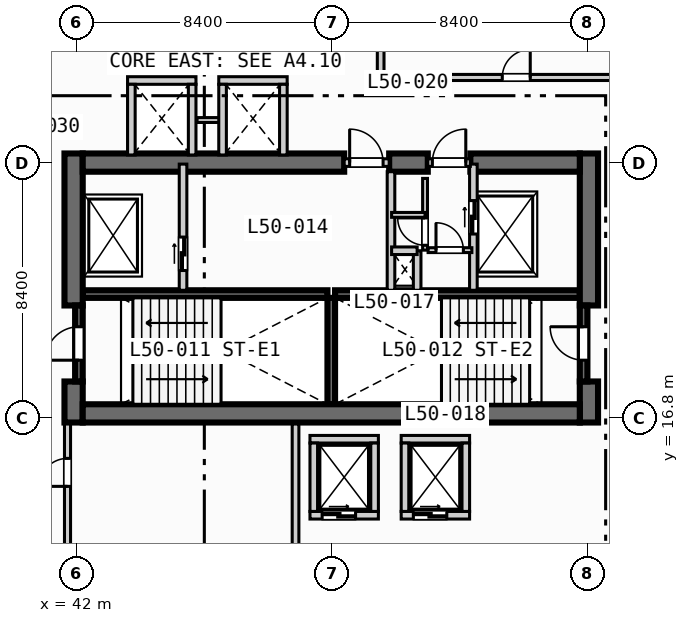
"""IFC4 building model, lengths in metres.
Left out: names, types, materials, properties, quantities, classifications, styles, units other than length and angle.
Written with IfcOpenShell. Run it as: python <this file> out.ifc"""

import sys

from ifc_helpers import new_model, si_unit, direction, frame, frame_2d, origin, place, context, subcontext, project, spatial, rectangle, extrude, element, fill, save


model = new_model("IFC4")
c1 = context("Model", 3, precision=1e-05, world=origin(), true_north=direction((0.0, 1.0)))
c2 = subcontext(c1, "Body", "Model", "MODEL_VIEW")
j1 = project(units=[si_unit("LENGTHUNIT", "METRE"), si_unit("PLANEANGLEUNIT", "RADIAN")], contexts=[c1])
p1 = place(None, origin())
s1 = spatial("IfcSite", under=j1, at=p1, CompositionType="ELEMENT")
p2 = place(p1, origin())
s2 = spatial("IfcBuilding", under=s1, at=p2, CompositionType="ELEMENT")
p3 = place(p2, frame((0.0, 0.0, 205.0)))
s3 = spatial("IfcBuildingStorey", under=s2, at=p3, CompositionType="ELEMENT", Elevation=205.0)
for number, where, z_axis, x_axis in (
    (1, (42.2, 20.875, 0.0), (0.0, 0.0, 1.0), (1.0, 0.0, 0.0)),
    (2, (50.5, 20.875, 0.0), (0.0, 0.0, 1.0), (1.0, 0.0, 0.0)),
):
    element("IfcWall", number, at=place(p3, frame(where, z_axis=z_axis, x_axis=x_axis)), inside=s3, PredefinedType="SOLIDWALL", context=c2, shape_type="SweptSolid", body=[
        extrude(rectangle(XDim=8.05, YDim=0.25, at=frame_2d((4.025, 0.0))), origin(), (0.0, 0.0, 1.0), 3.47),
    ])
p4 = place(p3, frame((50.375, 17.25, 0.0), z_axis=(0.0, 0.0, 1.0), x_axis=(0.0, 1.0, 0.0)))
e3 = element("IfcWall", 3, at=p4, inside=s3, PredefinedType="SOLIDWALL", context=c2, shape_type="SweptSolid", body=[
    extrude(rectangle(XDim=3.5, YDim=0.25, at=frame_2d((1.75, 0.0))), origin(), (0.0, 0.0, 1.0), 3.47),
])
p5 = place(p3, frame((41.9, 16.65, 0.0), z_axis=(0.0, 0.0, 1.0), x_axis=(0.0, 1.0, 0.0)))
e4 = element("IfcWall", 4, at=p5, inside=s3, PredefinedType="SHEAR", context=c2, shape_type="SweptSolid", body=[
    extrude(rectangle(XDim=1.35, YDim=0.6, at=frame_2d((0.675, 0.0))), origin(), (0.0, 0.0, 1.0), 3.47),
])
p6 = place(p3, frame((41.9, 20.5, 0.0), z_axis=(0.0, 0.0, 1.0), x_axis=(0.0, 1.0, 0.0)))
e5 = element("IfcWall", 5, at=p6, inside=s3, PredefinedType="SHEAR", context=c2, shape_type="SweptSolid", body=[
    extrude(rectangle(XDim=5.0, YDim=0.6, at=frame_2d((2.5, 0.0))), origin(), (0.0, 0.0, 1.0), 3.47),
])
p7 = place(p3, frame((58.85, 16.65, 0.0), z_axis=(0.0, 0.0, 1.0), x_axis=(0.0, 1.0, 0.0)))
e6 = element("IfcWall", 6, at=p7, inside=s3, PredefinedType="SHEAR", context=c2, shape_type="SweptSolid", body=[
    extrude(rectangle(XDim=1.35, YDim=0.6, at=frame_2d((0.675, 0.0))), origin(), (0.0, 0.0, 1.0), 3.47),
])
p8 = place(p3, frame((58.85, 20.5, 0.0), z_axis=(0.0, 0.0, 1.0), x_axis=(0.0, 1.0, 0.0)))
e7 = element("IfcWall", 7, at=p8, inside=s3, PredefinedType="SHEAR", context=c2, shape_type="SweptSolid", body=[
    extrude(rectangle(XDim=5.0, YDim=0.6, at=frame_2d((2.5, 0.0))), origin(), (0.0, 0.0, 1.0), 3.47),
])
p9 = place(p3, frame((42.2, 16.95, 0.0), z_axis=(0.0, 0.0, 1.0), x_axis=(1.0, 0.0, 0.0)))
e8 = element("IfcWall", 8, at=p9, inside=s3, PredefinedType="SHEAR", context=c2, shape_type="SweptSolid", body=[
    extrude(rectangle(XDim=16.35, YDim=0.6, at=frame_2d((8.175, 0.0))), origin(), (0.0, 0.0, 1.0), 3.47),
])
p10 = place(p3, frame((42.2, 25.2, 0.0), z_axis=(0.0, 0.0, 1.0), x_axis=(1.0, 0.0, 0.0)))
e9 = element("IfcWall", 9, at=p10, inside=s3, PredefinedType="SHEAR", context=c2, shape_type="SweptSolid", body=[
    extrude(rectangle(XDim=8.6, YDim=0.6, at=frame_2d((4.3, 0.0))), origin(), (0.0, 0.0, 1.0), 3.47),
])
p11 = place(p3, frame((52.28, 25.2, 0.0), z_axis=(0.0, 0.0, 1.0), x_axis=(1.0, 0.0, 0.0)))
e10 = element("IfcWall", 10, at=p11, inside=s3, PredefinedType="SHEAR", context=c2, shape_type="SweptSolid", body=[
    extrude(rectangle(XDim=1.27, YDim=0.6, at=frame_2d((0.635, 0.0))), origin(), (0.0, 0.0, 1.0), 3.47),
])
p12 = place(p3, frame((54.95, 25.2, 0.0), z_axis=(0.0, 0.0, 1.0), x_axis=(1.0, 0.0, 0.0)))
e11 = element("IfcWall", 11, at=p12, inside=s3, PredefinedType="SHEAR", context=c2, shape_type="SweptSolid", body=[
    extrude(rectangle(XDim=3.6, YDim=0.6, at=frame_2d((1.8, 0.0))), origin(), (0.0, 0.0, 1.0), 3.47),
])
p13 = place(p3, frame((42.075, 18.0, 0.0), z_axis=(0.0, 0.0, 1.0), x_axis=(0.0, 1.0, 0.0)))
e12 = element("IfcWall", 12, at=p13, inside=s3, PredefinedType="SOLIDWALL", context=c2, shape_type="SweptSolid", body=[
    extrude(rectangle(XDim=2.5, YDim=0.25, at=frame_2d((1.25, 0.0))), origin(), (0.0, 0.0, 1.0), 3.47),
])
p14 = place(p13, frame((0.7, 0.0, 0.0)))
e13 = element("IfcOpeningElement", 13, at=p14, cuts=e12, PredefinedType="OPENING", context=c2, shape_type="SweptSolid", body=[
    extrude(rectangle(XDim=1.1, YDim=2.15, at=frame_2d((0.55, 1.075))), frame((0.0, 0.135, 0.0), z_axis=(0.0, -1.0, 0.0), x_axis=(1.0, 0.0, 0.0)), (0.0, 0.0, 1.0), 0.27),
])
p15 = place(p3, frame((58.675, 18.0, 0.0), z_axis=(0.0, 0.0, 1.0), x_axis=(0.0, 1.0, 0.0)))
e14 = element("IfcWall", 14, at=p15, inside=s3, PredefinedType="SOLIDWALL", context=c2, shape_type="SweptSolid", body=[
    extrude(rectangle(XDim=2.5, YDim=0.25, at=frame_2d((1.25, 0.0))), origin(), (0.0, 0.0, 1.0), 3.47),
])
p16 = place(p15, frame((0.7, 0.0, 0.0)))
e15 = element("IfcOpeningElement", 15, at=p16, cuts=e14, PredefinedType="OPENING", context=c2, shape_type="SweptSolid", body=[
    extrude(rectangle(XDim=1.1, YDim=2.15, at=frame_2d((0.55, 1.075))), frame((0.0, 0.135, 0.0), z_axis=(0.0, -1.0, 0.0), x_axis=(1.0, 0.0, 0.0)), (0.0, 0.0, 1.0), 0.27),
])
p17 = place(p3, frame((45.5, 21.0, 0.0), z_axis=(0.0, 0.0, 1.0), x_axis=(0.0, 1.0, 0.0)))
e16 = element("IfcWall", 16, at=p17, inside=s3, PredefinedType="SOLIDWALL", context=c2, shape_type="SweptSolid", body=[
    extrude(rectangle(XDim=4.15, YDim=0.25, at=frame_2d((2.075, 0.0))), origin(), (0.0, 0.0, 1.0), 3.47),
])
p18 = place(p17, frame((0.65, 0.0, 0.0)))
e17 = element("IfcOpeningElement", 17, at=p18, cuts=e16, PredefinedType="OPENING", context=c2, shape_type="SweptSolid", body=[
    extrude(rectangle(XDim=1.1, YDim=2.15, at=frame_2d((0.55, 1.075))), frame((0.0, 0.135, 0.0), z_axis=(0.0, -1.0, 0.0), x_axis=(1.0, 0.0, 0.0)), (0.0, 0.0, 1.0), 0.27),
])
p19 = place(p3, frame((50.8, 25.2, 0.0), z_axis=(0.0, 0.0, 1.0), x_axis=(1.0, 0.0, 0.0)))
e18 = element("IfcWall", 18, at=p19, inside=s3, PredefinedType="SOLIDWALL", context=c2, shape_type="SweptSolid", body=[
    extrude(rectangle(XDim=1.48, YDim=0.25, at=frame_2d((0.74, 0.0))), origin(), (0.0, 0.0, 1.0), 3.47),
])
p20 = place(p19, frame((0.18, 0.0, 0.0)))
e19 = element("IfcOpeningElement", 19, at=p20, cuts=e18, PredefinedType="OPENING", context=c2, shape_type="SweptSolid", body=[
    extrude(rectangle(XDim=1.1, YDim=2.15, at=frame_2d((0.55, 1.075))), frame((0.0, 0.135, 0.0), z_axis=(0.0, -1.0, 0.0), x_axis=(1.0, 0.0, 0.0)), (0.0, 0.0, 1.0), 0.27),
])
p21 = place(p3, frame((52.34, 21.0, 0.0), z_axis=(0.0, 0.0, 1.0), x_axis=(0.0, 1.0, 0.0)))
e20 = element("IfcWall", 20, at=p21, inside=s3, PredefinedType="SOLIDWALL", context=c2, shape_type="SweptSolid", body=[
    extrude(rectangle(XDim=3.9, YDim=0.25, at=frame_2d((1.95, 0.0))), origin(), (0.0, 0.0, 1.0), 3.47),
])
p22 = place(p3, frame((55.05, 21.0, 0.0), z_axis=(0.0, 0.0, 1.0), x_axis=(0.0, 1.0, 0.0)))
e21 = element("IfcWall", 21, at=p22, inside=s3, PredefinedType="SOLIDWALL", context=c2, shape_type="SweptSolid", body=[
    extrude(rectangle(XDim=4.15, YDim=0.25, at=frame_2d((2.075, 0.0))), origin(), (0.0, 0.0, 1.0), 3.47),
])
p23 = place(p22, frame((1.85, 0.0, 0.0)))
e22 = element("IfcOpeningElement", 22, at=p23, cuts=e21, PredefinedType="OPENING", context=c2, shape_type="SweptSolid", body=[
    extrude(rectangle(XDim=1.1, YDim=2.15, at=frame_2d((0.55, 1.075))), frame((0.0, 0.135, 0.0), z_axis=(0.0, -1.0, 0.0), x_axis=(1.0, 0.0, 0.0)), (0.0, 0.0, 1.0), 0.27),
])
p24 = place(p3, frame((53.55, 25.2, 0.0), z_axis=(0.0, 0.0, 1.0), x_axis=(1.0, 0.0, 0.0)))
e23 = element("IfcWall", 23, at=p24, inside=s3, PredefinedType="SOLIDWALL", context=c2, shape_type="SweptSolid", body=[
    extrude(rectangle(XDim=1.4, YDim=0.25, at=frame_2d((0.7, 0.0))), origin(), (0.0, 0.0, 1.0), 3.47),
])
p25 = place(p24, frame((0.15, 0.0, 0.0)))
e24 = element("IfcOpeningElement", 24, at=p25, cuts=e23, PredefinedType="OPENING", context=c2, shape_type="SweptSolid", body=[
    extrude(rectangle(XDim=1.1, YDim=2.15, at=frame_2d((0.55, 1.075))), frame((0.0, 0.135, 0.0), z_axis=(0.0, -1.0, 0.0), x_axis=(1.0, 0.0, 0.0)), (0.0, 0.0, 1.0), 0.27),
])
p26 = place(p3, frame((53.2, 21.0, 0.0), z_axis=(0.0, 0.0, 1.0), x_axis=(0.0, 1.0, 0.0)))
e25 = element("IfcWall", 25, at=p26, inside=s3, PredefinedType="SOLIDWALL", context=c2, shape_type="SweptSolid", body=[
    extrude(rectangle(XDim=1.3, YDim=0.25, at=frame_2d((0.65, 0.0))), origin(), (0.0, 0.0, 1.0), 3.47),
])
p27 = place(p3, frame((52.36, 22.3, 0.0), z_axis=(0.0, 0.0, 1.0), x_axis=(1.0, 0.0, 0.0)))
e26 = element("IfcWall", 26, at=p27, inside=s3, PredefinedType="SOLIDWALL", context=c2, shape_type="SweptSolid", body=[
    extrude(rectangle(XDim=0.84, YDim=0.25, at=frame_2d((0.42, 0.0))), origin(), (0.0, 0.0, 1.0), 3.47),
])
p28 = place(p3, frame((53.56, 22.32, 0.0), z_axis=(0.0, 0.0, 1.0), x_axis=(1.0, 0.0, 0.0)))
e27 = element("IfcWall", 27, at=p28, inside=s3, PredefinedType="PARTITIONING", context=c2, shape_type="SweptSolid", body=[
    extrude(rectangle(XDim=1.44, YDim=0.16, at=frame_2d((0.72, 0.0))), origin(), (0.0, 0.0, 1.0), 3.47),
])
p29 = place(p28, frame((0.26, 0.0, 0.0)))
e28 = element("IfcOpeningElement", 28, at=p29, cuts=e27, PredefinedType="OPENING", context=c2, shape_type="SweptSolid", body=[
    extrude(rectangle(XDim=0.9, YDim=2.1, at=frame_2d((0.45, 1.05))), frame((0.0, 0.09, 0.0), z_axis=(0.0, -1.0, 0.0), x_axis=(1.0, 0.0, 0.0)), (0.0, 0.0, 1.0), 0.18),
])
p30 = place(p3, frame((53.46, 22.32, 0.0), z_axis=(0.0, 0.0, 1.0), x_axis=(0.0, 1.0, 0.0)))
e29 = element("IfcWall", 29, at=p30, inside=s3, PredefinedType="PARTITIONING", context=c2, shape_type="SweptSolid", body=[
    extrude(rectangle(XDim=2.36, YDim=0.16, at=frame_2d((1.18, 0.0))), origin(), (0.0, 0.0, 1.0), 3.47),
])
p31 = place(p30, frame((0.16, 0.0, 0.0)))
e30 = element("IfcOpeningElement", 30, at=p31, cuts=e29, PredefinedType="OPENING", context=c2, shape_type="SweptSolid", body=[
    extrude(rectangle(XDim=0.9, YDim=2.1, at=frame_2d((0.45, 1.05))), frame((0.0, 0.09, 0.0), z_axis=(0.0, -1.0, 0.0), x_axis=(1.0, 0.0, 0.0)), (0.0, 0.0, 1.0), 0.18),
])
p32 = place(p3, frame((52.36, 23.48, 0.0), z_axis=(0.0, 0.0, 1.0), x_axis=(1.0, 0.0, 0.0)))
e31 = element("IfcWall", 31, at=p32, inside=s3, PredefinedType="PARTITIONING", context=c2, shape_type="SweptSolid", body=[
    extrude(rectangle(XDim=1.1, YDim=0.16, at=frame_2d((0.55, 0.0))), origin(), (0.0, 0.0, 1.0), 3.47),
])
p33 = place(p3, frame((49.675, 13.6, 0.0), z_axis=(0.0, 0.0, 1.0), x_axis=(1.0, 0.0, 0.0)))
e32 = element("IfcWall", 32, at=p33, inside=s3, PredefinedType="SOLIDWALL", context=c2, shape_type="SweptSolid", body=[
    extrude(rectangle(XDim=2.25, YDim=0.25, at=frame_2d((1.125, 0.0))), origin(), (0.0, 0.0, 1.0), 3.47),
])
p34 = place(p33, frame((0.4, 0.0, 0.0)))
e33 = element("IfcOpeningElement", 33, at=p34, cuts=e32, PredefinedType="OPENING", context=c2, shape_type="SweptSolid", body=[
    extrude(rectangle(XDim=1.1, YDim=2.15, at=frame_2d((0.55, 1.075))), frame((0.0, 0.135, 0.0), z_axis=(0.0, -1.0, 0.0), x_axis=(1.0, 0.0, 0.0)), (0.0, 0.0, 1.0), 0.27),
])
for number, where, z_axis, x_axis in (
    (34, (49.675, 16.1, 0.0), (0.0, 0.0, 1.0), (1.0, 0.0, 0.0)),
    (35, (49.8, 13.725, 0.0), (0.0, 0.0, 1.0), (0.0, 1.0, 0.0)),
    (36, (51.8, 13.725, 0.0), (0.0, 0.0, 1.0), (0.0, 1.0, 0.0)),
):
    element("IfcWall", number, at=place(p3, frame(where, z_axis=z_axis, x_axis=x_axis)), inside=s3, PredefinedType="SOLIDWALL", context=c2, shape_type="SweptSolid", body=[
        extrude(rectangle(XDim=2.25, YDim=0.25, at=frame_2d((1.125, 0.0))), origin(), (0.0, 0.0, 1.0), 3.47),
    ])
p35 = place(p3, frame((52.675, 13.6, 0.0), z_axis=(0.0, 0.0, 1.0), x_axis=(1.0, 0.0, 0.0)))
e37 = element("IfcWall", 37, at=p35, inside=s3, PredefinedType="SOLIDWALL", context=c2, shape_type="SweptSolid", body=[
    extrude(rectangle(XDim=2.25, YDim=0.25, at=frame_2d((1.125, 0.0))), origin(), (0.0, 0.0, 1.0), 3.47),
])
p36 = place(p35, frame((0.4, 0.0, 0.0)))
e38 = element("IfcOpeningElement", 38, at=p36, cuts=e37, PredefinedType="OPENING", context=c2, shape_type="SweptSolid", body=[
    extrude(rectangle(XDim=1.1, YDim=2.15, at=frame_2d((0.55, 1.075))), frame((0.0, 0.135, 0.0), z_axis=(0.0, -1.0, 0.0), x_axis=(1.0, 0.0, 0.0)), (0.0, 0.0, 1.0), 0.27),
])
for number, where, z_axis, x_axis in (
    (39, (52.675, 16.1, 0.0), (0.0, 0.0, 1.0), (1.0, 0.0, 0.0)),
    (40, (52.8, 13.725, 0.0), (0.0, 0.0, 1.0), (0.0, 1.0, 0.0)),
    (41, (54.8, 13.725, 0.0), (0.0, 0.0, 1.0), (0.0, 1.0, 0.0)),
    (42, (43.675, 27.9, 0.0), (0.0, 0.0, 1.0), (1.0, 0.0, 0.0)),
):
    element("IfcWall", number, at=place(p3, frame(where, z_axis=z_axis, x_axis=x_axis)), inside=s3, PredefinedType="SOLIDWALL", context=c2, shape_type="SweptSolid", body=[
        extrude(rectangle(XDim=2.25, YDim=0.25, at=frame_2d((1.125, 0.0))), origin(), (0.0, 0.0, 1.0), 3.47),
    ])
for number, where, z_axis, x_axis in (
    (43, (43.8, 25.45, 0.0), (0.0, 0.0, 1.0), (0.0, 1.0, 0.0)),
    (44, (45.8, 25.45, 0.0), (0.0, 0.0, 1.0), (0.0, 1.0, 0.0)),
):
    element("IfcWall", number, at=place(p3, frame(where, z_axis=z_axis, x_axis=x_axis)), inside=s3, PredefinedType="SOLIDWALL", context=c2, shape_type="SweptSolid", body=[
        extrude(rectangle(XDim=2.325, YDim=0.25, at=frame_2d((1.163, 0.0))), origin(), (0.0, 0.0, 1.0), 3.47),
    ])
p37 = place(p3, frame((45.96, 26.6, 0.0), z_axis=(0.0, 0.0, 1.0), x_axis=(1.0, 0.0, 0.0)))
e45 = element("IfcWall", 45, at=p37, inside=s3, PredefinedType="PARTITIONING", context=c2, shape_type="SweptSolid", body=[
    extrude(rectangle(XDim=0.88, YDim=0.16, at=frame_2d((0.44, 0.0))), origin(), (0.0, 0.0, 1.0), 3.47),
])
p38 = place(p3, frame((46.675, 27.9, 0.0), z_axis=(0.0, 0.0, 1.0), x_axis=(1.0, 0.0, 0.0)))
e46 = element("IfcWall", 46, at=p38, inside=s3, PredefinedType="SOLIDWALL", context=c2, shape_type="SweptSolid", body=[
    extrude(rectangle(XDim=2.25, YDim=0.25, at=frame_2d((1.125, 0.0))), origin(), (0.0, 0.0, 1.0), 3.47),
])
for number, where, z_axis, x_axis in (
    (47, (46.8, 25.45, 0.0), (0.0, 0.0, 1.0), (0.0, 1.0, 0.0)),
    (48, (48.8, 25.45, 0.0), (0.0, 0.0, 1.0), (0.0, 1.0, 0.0)),
):
    element("IfcWall", number, at=place(p3, frame(where, z_axis=z_axis, x_axis=x_axis)), inside=s3, PredefinedType="SOLIDWALL", context=c2, shape_type="SweptSolid", body=[
        extrude(rectangle(XDim=2.325, YDim=0.25, at=frame_2d((1.163, 0.0))), origin(), (0.0, 0.0, 1.0), 3.47),
    ])
p39 = place(p3, frame((41.7, 0.35, 0.0), z_axis=(0.0, 0.0, 1.0), x_axis=(0.0, 1.0, 0.0)))
e49 = element("IfcWall", 49, at=p39, inside=s3, PredefinedType="PARTITIONING", context=c2, shape_type="SweptSolid", body=[
    extrude(rectangle(XDim=16.25, YDim=0.2, at=frame_2d((8.125, 0.0))), origin(), (0.0, 0.0, 1.0), 2.82),
])
p40 = place(p39, frame((14.2, 0.0, 0.0)))
e50 = element("IfcOpeningElement", 50, at=p40, cuts=e49, PredefinedType="OPENING", context=c2, shape_type="SweptSolid", body=[
    extrude(rectangle(XDim=0.92, YDim=2.1, at=frame_2d((0.46, 1.05))), frame((0.0, 0.11, 0.0), z_axis=(0.0, -1.0, 0.0), x_axis=(1.0, 0.0, 0.0)), (0.0, 0.0, 1.0), 0.22),
])
p41 = place(p3, frame((49.2, 0.35, 0.0), z_axis=(0.0, 0.0, 1.0), x_axis=(0.0, 1.0, 0.0)))
e51 = element("IfcWall", 51, at=p41, inside=s3, PredefinedType="PARTITIONING", context=c2, shape_type="SweptSolid", body=[
    extrude(rectangle(XDim=16.25, YDim=0.22, at=frame_2d((8.125, 0.0))), origin(), (0.0, 0.0, 1.0), 3.47),
])
p42 = place(p3, frame((52.0, 28.0, 0.0), z_axis=(0.0, 0.0, 1.0), x_axis=(1.0, 0.0, 0.0)))
e52 = element("IfcWall", 52, at=p42, inside=s3, PredefinedType="PARTITIONING", context=c2, shape_type="SweptSolid", body=[
    extrude(rectangle(XDim=23.25, YDim=0.2, at=frame_2d((11.625, 0.0))), origin(), (0.0, 0.0, 1.0), 3.47),
])
p43 = place(p42, frame((4.0, 0.0, 0.0)))
e53 = element("IfcOpeningElement", 53, at=p43, cuts=e52, PredefinedType="OPENING", context=c2, shape_type="SweptSolid", body=[
    extrude(rectangle(XDim=0.92, YDim=2.1, at=frame_2d((0.46, 1.05))), frame((0.0, 0.11, 0.0), z_axis=(0.0, -1.0, 0.0), x_axis=(1.0, 0.0, 0.0)), (0.0, 0.0, 1.0), 0.22),
])
p44 = place(p3, frame((52.0, 28.0, 0.0), z_axis=(0.0, 0.0, 1.0), x_axis=(0.0, 1.0, 0.0)))
e54 = element("IfcWall", 54, at=p44, inside=s3, PredefinedType="PARTITIONING", context=c2, shape_type="SweptSolid", body=[
    extrude(rectangle(XDim=5.3, YDim=0.22, at=frame_2d((2.65, 0.0))), origin(), (0.0, 0.0, 1.0), 3.47),
])
p45 = place(p14, origin())
e55 = element("IfcDoor", 55, at=p45, inside=s3, OperationType="SINGLE_SWING_LEFT", PredefinedType="DOOR", context=c2, shape_type="SweptSolid", body=[
    extrude(rectangle(XDim=1.1, YDim=2.15, at=frame_2d((0.55, 1.075))), frame((0.0, 0.025, 0.0), z_axis=(0.0, -1.0, 0.0), x_axis=(1.0, 0.0, 0.0)), (0.0, 0.0, 1.0), 0.05),
])
fill(e13, e55)
p46 = place(p16, origin())
e56 = element("IfcDoor", 56, at=p46, inside=s3, OperationType="SINGLE_SWING_RIGHT", PredefinedType="DOOR", context=c2, shape_type="SweptSolid", body=[
    extrude(rectangle(XDim=1.1, YDim=2.15, at=frame_2d((0.55, 1.075))), frame((0.0, 0.025, 0.0), z_axis=(0.0, -1.0, 0.0), x_axis=(1.0, 0.0, 0.0)), (0.0, 0.0, 1.0), 0.05),
])
fill(e15, e56)
p47 = place(p18, origin())
e57 = element("IfcDoor", 57, at=p47, inside=s3, OperationType="SLIDING_TO_LEFT", PredefinedType="DOOR", context=c2, shape_type="SweptSolid", body=[
    extrude(rectangle(XDim=1.1, YDim=2.15, at=frame_2d((0.55, 1.075))), frame((0.0, 0.025, 0.0), z_axis=(0.0, -1.0, 0.0), x_axis=(1.0, 0.0, 0.0)), (0.0, 0.0, 1.0), 0.05),
])
fill(e17, e57)
p48 = place(p20, origin())
e58 = element("IfcDoor", 58, at=p48, inside=s3, OperationType="SINGLE_SWING_LEFT", PredefinedType="DOOR", context=c2, shape_type="SweptSolid", body=[
    extrude(rectangle(XDim=1.1, YDim=2.15, at=frame_2d((0.55, 1.075))), frame((0.0, 0.025, 0.0), z_axis=(0.0, -1.0, 0.0), x_axis=(1.0, 0.0, 0.0)), (0.0, 0.0, 1.0), 0.05),
])
fill(e19, e58)
p49 = place(p23, origin())
e59 = element("IfcDoor", 59, at=p49, inside=s3, OperationType="SLIDING_TO_LEFT", PredefinedType="DOOR", context=c2, shape_type="SweptSolid", body=[
    extrude(rectangle(XDim=1.1, YDim=2.15, at=frame_2d((0.55, 1.075))), frame((0.0, 0.025, 0.0), z_axis=(0.0, -1.0, 0.0), x_axis=(1.0, 0.0, 0.0)), (0.0, 0.0, 1.0), 0.05),
])
fill(e22, e59)
p50 = place(p25, origin())
e60 = element("IfcDoor", 60, at=p50, inside=s3, OperationType="SINGLE_SWING_RIGHT", PredefinedType="DOOR", context=c2, shape_type="SweptSolid", body=[
    extrude(rectangle(XDim=1.1, YDim=2.15, at=frame_2d((0.55, 1.075))), frame((0.0, 0.025, 0.0), z_axis=(0.0, -1.0, 0.0), x_axis=(1.0, 0.0, 0.0)), (0.0, 0.0, 1.0), 0.05),
])
fill(e24, e60)
p51 = place(p29, origin())
e61 = element("IfcDoor", 61, at=p51, inside=s3, OperationType="SINGLE_SWING_LEFT", PredefinedType="DOOR", context=c2, shape_type="SweptSolid", body=[
    extrude(rectangle(XDim=0.9, YDim=2.1, at=frame_2d((0.45, 1.05))), frame((0.0, 0.025, 0.0), z_axis=(0.0, -1.0, 0.0), x_axis=(1.0, 0.0, 0.0)), (0.0, 0.0, 1.0), 0.05),
])
fill(e28, e61)
p52 = place(p31, origin())
e62 = element("IfcDoor", 62, at=p52, inside=s3, OperationType="SINGLE_SWING_RIGHT", PredefinedType="DOOR", context=c2, shape_type="SweptSolid", body=[
    extrude(rectangle(XDim=0.9, YDim=2.1, at=frame_2d((0.45, 1.05))), frame((0.0, 0.025, 0.0), z_axis=(0.0, -1.0, 0.0), x_axis=(1.0, 0.0, 0.0)), (0.0, 0.0, 1.0), 0.05),
])
fill(e30, e62)
p53 = place(p34, origin())
e63 = element("IfcDoor", 63, at=p53, inside=s3, OperationType="SLIDING_TO_LEFT", PredefinedType="DOOR", context=c2, shape_type="SweptSolid", body=[
    extrude(rectangle(XDim=1.1, YDim=2.15, at=frame_2d((0.55, 1.075))), frame((0.0, 0.025, 0.0), z_axis=(0.0, -1.0, 0.0), x_axis=(1.0, 0.0, 0.0)), (0.0, 0.0, 1.0), 0.05),
])
fill(e33, e63)
p54 = place(p36, origin())
e64 = element("IfcDoor", 64, at=p54, inside=s3, OperationType="SLIDING_TO_LEFT", PredefinedType="DOOR", context=c2, shape_type="SweptSolid", body=[
    extrude(rectangle(XDim=1.1, YDim=2.15, at=frame_2d((0.55, 1.075))), frame((0.0, 0.025, 0.0), z_axis=(0.0, -1.0, 0.0), x_axis=(1.0, 0.0, 0.0)), (0.0, 0.0, 1.0), 0.05),
])
fill(e38, e64)
p55 = place(p40, origin())
e65 = element("IfcDoor", 65, at=p55, inside=s3, OperationType="SINGLE_SWING_LEFT", PredefinedType="DOOR", context=c2, shape_type="SweptSolid", body=[
    extrude(rectangle(XDim=0.92, YDim=2.1, at=frame_2d((0.46, 1.05))), frame((0.0, 0.025, 0.0), z_axis=(0.0, -1.0, 0.0), x_axis=(1.0, 0.0, 0.0)), (0.0, 0.0, 1.0), 0.05),
])
fill(e50, e65)
p56 = place(p43, origin())
e66 = element("IfcDoor", 66, at=p56, inside=s3, OperationType="SINGLE_SWING_RIGHT", PredefinedType="DOOR", context=c2, shape_type="SweptSolid", body=[
    extrude(rectangle(XDim=0.92, YDim=2.1, at=frame_2d((0.46, 1.05))), frame((0.0, 0.025, 0.0), z_axis=(0.0, -1.0, 0.0), x_axis=(1.0, 0.0, 0.0)), (0.0, 0.0, 1.0), 0.05),
])
fill(e53, e66)
save(model, sys.argv[1])
